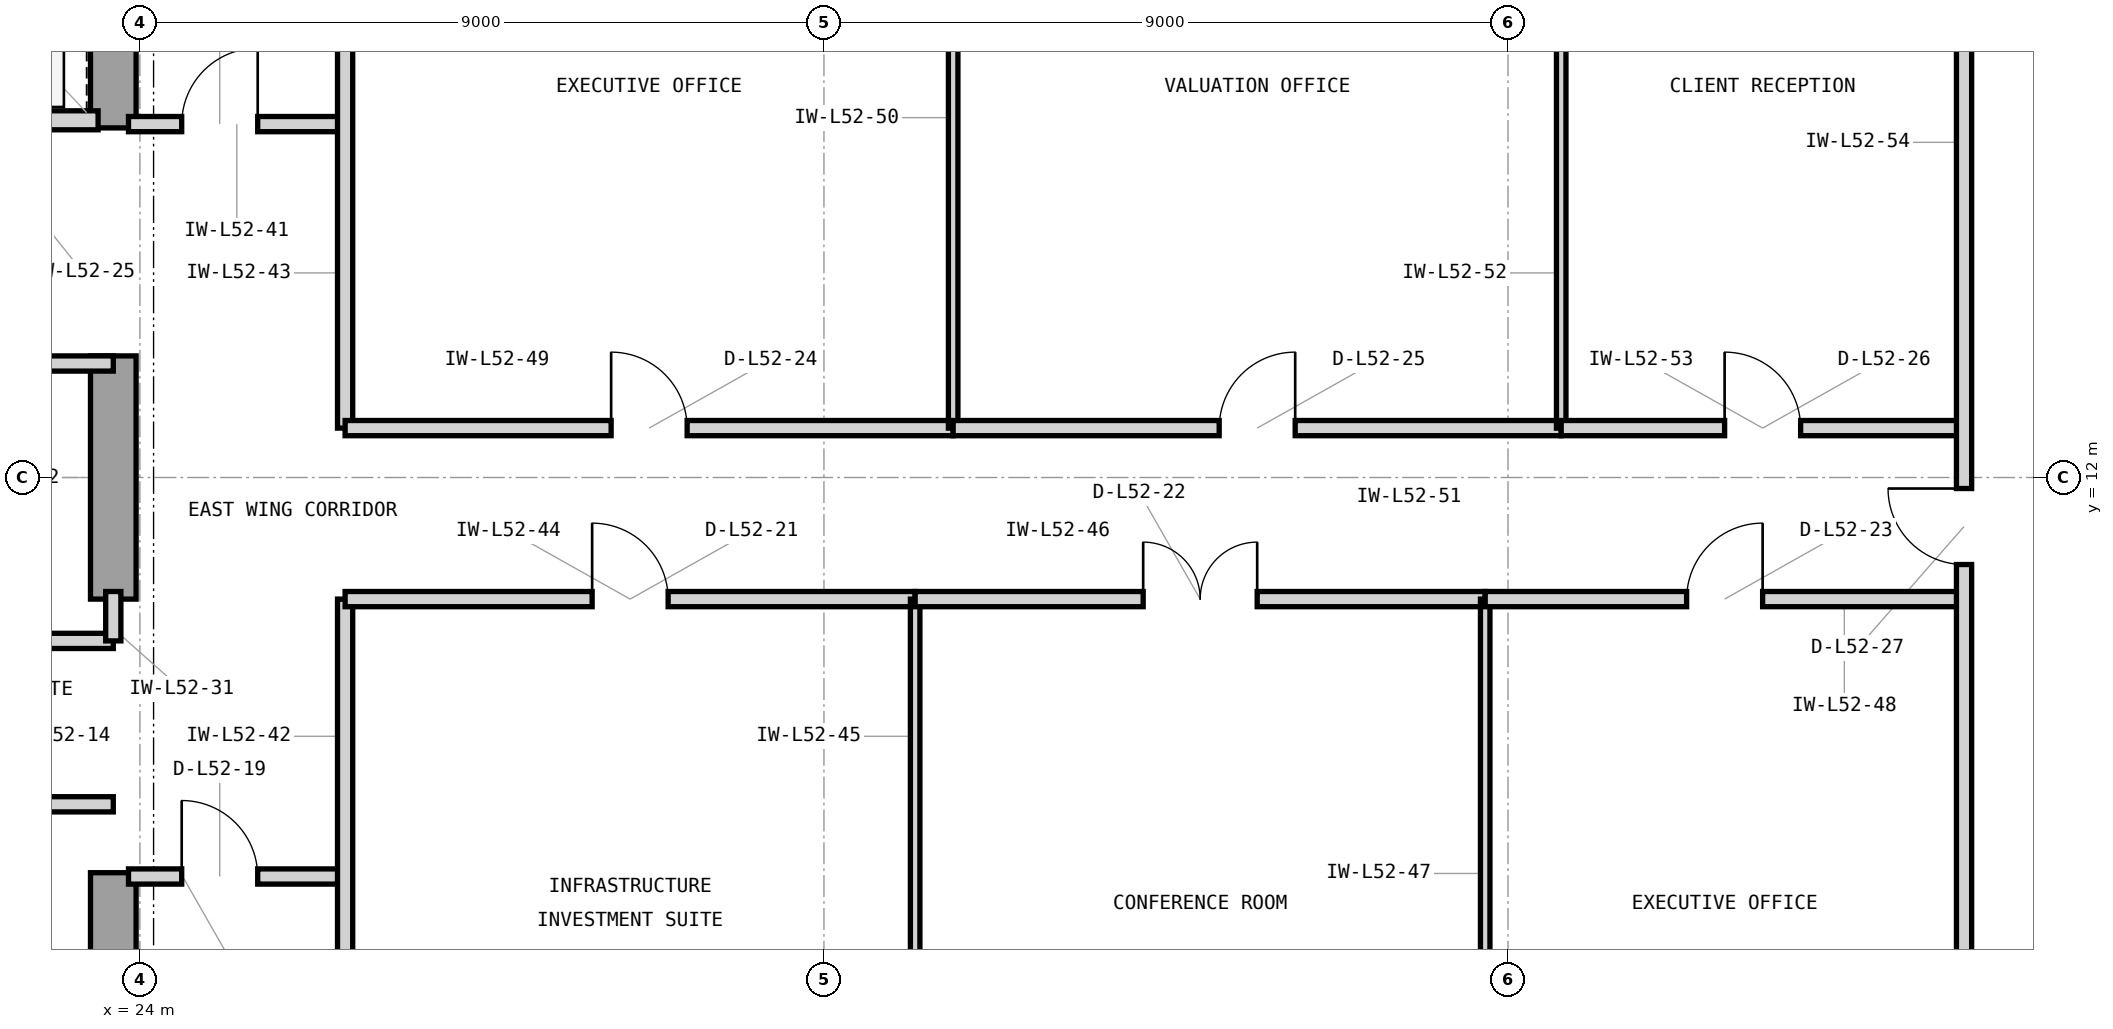
"""IFC4 building model, lengths in metres.
Left out: names, types, materials, properties, quantities, classifications, styles, units other than length and angle.
Written with IfcOpenShell. Run it as: python <this file> out.ifc"""

import sys

from ifc_helpers import new_model, si_unit, direction, frame, frame_2d, origin, place, context, subcontext, project, spatial, rectangle, extrude, element, fill, save


model = new_model("IFC4")
c1 = context("Model", 3, precision=1e-05, world=origin(), true_north=direction((0.0, 1.0)))
c2 = subcontext(c1, "Body", "Model", "MODEL_VIEW")
j1 = project(units=[si_unit("LENGTHUNIT", "METRE"), si_unit("PLANEANGLEUNIT", "RADIAN")], contexts=[c1])
p1 = place(None, origin())
s1 = spatial("IfcSite", under=j1, at=p1, CompositionType="ELEMENT")
p2 = place(p1, origin())
s2 = spatial("IfcBuilding", under=s1, at=p2, CompositionType="ELEMENT")
p3 = place(p2, frame((0.0, 0.0, 215.1)))
s3 = spatial("IfcBuildingStorey", under=s2, at=p3, CompositionType="ELEMENT", Elevation=215.1)
p4 = place(p3, frame((23.65, 3.65, 0.0), z_axis=(0.0, 0.0, 1.0), x_axis=(0.0, 1.0, 0.0)))
e1 = element("IfcWall", 1, at=p4, inside=s3, PredefinedType="SHEAR", context=c2, shape_type="SweptSolid", body=[
    extrude(rectangle(XDim=3.15, YDim=0.6, at=frame_2d((1.575, 0.0))), origin(), (0.0, 0.0, 1.0), 3.9),
])
p5 = place(p3, frame((23.65, 10.4, 0.0), z_axis=(0.0, 0.0, 1.0), x_axis=(0.0, 1.0, 0.0)))
e2 = element("IfcWall", 2, at=p5, inside=s3, PredefinedType="SHEAR", context=c2, shape_type="SweptSolid", body=[
    extrude(rectangle(XDim=3.2, YDim=0.6, at=frame_2d((1.6, 0.0))), origin(), (0.0, 0.0, 1.0), 3.9),
])
p6 = place(p3, frame((23.65, 16.6, 0.0), z_axis=(0.0, 0.0, 1.0), x_axis=(0.0, 1.0, 0.0)))
e3 = element("IfcWall", 3, at=p6, inside=s3, PredefinedType="SHEAR", context=c2, shape_type="SweptSolid", body=[
    extrude(rectangle(XDim=4.05, YDim=0.6, at=frame_2d((2.025, 0.0))), origin(), (0.0, 0.0, 1.0), 3.9),
])
p7 = place(p3, frame((21.05, 16.7, 0.0), z_axis=(0.0, 0.0, 1.0), x_axis=(1.0, 0.0, 0.0)))
e4 = element("IfcWall", 4, at=p7, inside=s3, PredefinedType="PARTITIONING", context=c2, shape_type="SweptSolid", body=[
    extrude(rectangle(XDim=2.4, YDim=0.25, at=frame_2d((1.2, 0.0))), origin(), (0.0, 0.0, 1.0), 3.283),
])
p8 = place(p7, frame((0.52, 0.0, 0.0)))
e5 = element("IfcOpeningElement", 5, at=p8, cuts=e4, PredefinedType="OPENING", context=c2, shape_type="SweptSolid", body=[
    extrude(rectangle(XDim=1.15, YDim=2.25, at=frame_2d((0.575, 1.125))), frame((0.0, 0.135, 0.0), z_axis=(0.0, -1.0, 0.0), x_axis=(1.0, 0.0, 0.0)), (0.0, 0.0, 1.0), 0.27),
])
p9 = place(p3, frame((19.15, 7.7, 0.0), z_axis=(0.0, 0.0, 1.0), x_axis=(1.0, 0.0, 0.0)))
e6 = element("IfcWall", 6, at=p9, inside=s3, PredefinedType="PARTITIONING", context=c2, shape_type="SweptSolid", body=[
    extrude(rectangle(XDim=4.5, YDim=0.2, at=frame_2d((2.25, 0.0))), origin(), (0.0, 0.0, 1.0), 3.69),
])
p10 = place(p9, frame((1.75, 0.0, 0.0)))
e7 = element("IfcOpeningElement", 7, at=p10, cuts=e6, PredefinedType="OPENING", context=c2, shape_type="SweptSolid", body=[
    extrude(rectangle(XDim=1.0, YDim=2.15, at=frame_2d((0.5, 1.075))), frame((0.0, 0.11, 0.0), z_axis=(0.0, -1.0, 0.0), x_axis=(1.0, 0.0, 0.0)), (0.0, 0.0, 1.0), 0.22),
])
p11 = place(p3, frame((14.825, 9.85, 0.0), z_axis=(0.0, 0.0, 1.0), x_axis=(1.0, 0.0, 0.0)))
e8 = element("IfcWall", 8, at=p11, inside=s3, PredefinedType="PARTITIONING", context=c2, shape_type="SweptSolid", body=[
    extrude(rectangle(XDim=8.825, YDim=0.2, at=frame_2d((4.413, 0.0))), origin(), (0.0, 0.0, 1.0), 3.69),
])
p12 = place(p3, frame((23.65, 9.85, 0.0), z_axis=(0.0, 0.0, 1.0), x_axis=(0.0, 1.0, 0.0)))
e9 = element("IfcWall", 9, at=p12, inside=s3, PredefinedType="PARTITIONING", context=c2, shape_type="SweptSolid", body=[
    extrude(rectangle(XDim=0.65, YDim=0.2, at=frame_2d((0.325, 0.0))), origin(), (0.0, 0.0, 1.0), 3.69),
])
p13 = place(p3, frame((19.85, 13.5, 0.0), z_axis=(0.0, 0.0, 1.0), x_axis=(1.0, 0.0, 0.0)))
e10 = element("IfcWall", 10, at=p13, inside=s3, PredefinedType="PARTITIONING", context=c2, shape_type="SweptSolid", body=[
    extrude(rectangle(XDim=3.8, YDim=0.2, at=frame_2d((1.9, 0.0))), origin(), (0.0, 0.0, 1.0), 3.283),
])
p14 = place(p13, frame((1.425, 0.0, 0.0)))
e11 = element("IfcOpeningElement", 11, at=p14, cuts=e10, PredefinedType="OPENING", context=c2, shape_type="SweptSolid", body=[
    extrude(rectangle(XDim=0.95, YDim=2.1, at=frame_2d((0.475, 1.05))), frame((0.0, 0.11, 0.0), z_axis=(0.0, -1.0, 0.0), x_axis=(1.0, 0.0, 0.0)), (0.0, 0.0, 1.0), 0.22),
])
p15 = place(p3, frame((23.85, 6.75, 0.0), z_axis=(0.0, 0.0, 1.0), x_axis=(1.0, 0.0, 0.0)))
e12 = element("IfcWall", 12, at=p15, inside=s3, PredefinedType="PARTITIONING", context=c2, shape_type="SweptSolid", body=[
    extrude(rectangle(XDim=2.85, YDim=0.2, at=frame_2d((1.425, 0.0))), origin(), (0.0, 0.0, 1.0), 3.69),
])
p16 = place(p15, frame((0.7, 0.0, 0.0)))
e13 = element("IfcOpeningElement", 13, at=p16, cuts=e12, PredefinedType="OPENING", context=c2, shape_type="SweptSolid", body=[
    extrude(rectangle(XDim=1.0, YDim=2.15, at=frame_2d((0.5, 1.075))), frame((0.0, 0.11, 0.0), z_axis=(0.0, -1.0, 0.0), x_axis=(1.0, 0.0, 0.0)), (0.0, 0.0, 1.0), 0.22),
])
p17 = place(p3, frame((23.85, 16.65, 0.0), z_axis=(0.0, 0.0, 1.0), x_axis=(1.0, 0.0, 0.0)))
e14 = element("IfcWall", 14, at=p17, inside=s3, PredefinedType="PARTITIONING", context=c2, shape_type="SweptSolid", body=[
    extrude(rectangle(XDim=2.85, YDim=0.2, at=frame_2d((1.425, 0.0))), origin(), (0.0, 0.0, 1.0), 3.69),
])
p18 = place(p17, frame((0.7, 0.0, 0.0)))
e15 = element("IfcOpeningElement", 15, at=p18, cuts=e14, PredefinedType="OPENING", context=c2, shape_type="SweptSolid", body=[
    extrude(rectangle(XDim=1.0, YDim=2.15, at=frame_2d((0.5, 1.075))), frame((0.0, 0.11, 0.0), z_axis=(0.0, -1.0, 0.0), x_axis=(1.0, 0.0, 0.0)), (0.0, 0.0, 1.0), 0.22),
])
p19 = place(p3, frame((26.7, 3.18, 0.0), z_axis=(0.0, 0.0, 1.0), x_axis=(0.0, 1.0, 0.0)))
e16 = element("IfcWall", 16, at=p19, inside=s3, PredefinedType="PARTITIONING", context=c2, shape_type="SweptSolid", body=[
    extrude(rectangle(XDim=7.22, YDim=0.2, at=frame_2d((3.61, 0.0))), origin(), (0.0, 0.0, 1.0), 3.69),
])
p20 = place(p3, frame((26.7, 12.65, 0.0), z_axis=(0.0, 0.0, 1.0), x_axis=(0.0, 1.0, 0.0)))
e17 = element("IfcWall", 17, at=p20, inside=s3, PredefinedType="PARTITIONING", context=c2, shape_type="SweptSolid", body=[
    extrude(rectangle(XDim=8.17, YDim=0.2, at=frame_2d((4.085, 0.0))), origin(), (0.0, 0.0, 1.0), 3.69),
])
p21 = place(p3, frame((26.7, 10.4, 0.0), z_axis=(0.0, 0.0, 1.0), x_axis=(1.0, 0.0, 0.0)))
e18 = element("IfcWall", 18, at=p21, inside=s3, PredefinedType="PARTITIONING", context=c2, shape_type="SweptSolid", body=[
    extrude(rectangle(XDim=7.5, YDim=0.2, at=frame_2d((3.75, 0.0))), origin(), (0.0, 0.0, 1.0), 3.69),
])
p22 = place(p21, frame((3.25, 0.0, 0.0)))
e19 = element("IfcOpeningElement", 19, at=p22, cuts=e18, PredefinedType="OPENING", context=c2, shape_type="SweptSolid", body=[
    extrude(rectangle(XDim=1.0, YDim=2.15, at=frame_2d((0.5, 1.075))), frame((0.0, 0.11, 0.0), z_axis=(0.0, -1.0, 0.0), x_axis=(1.0, 0.0, 0.0)), (0.0, 0.0, 1.0), 0.22),
])
p23 = place(p3, frame((34.2, 3.18, 0.0), z_axis=(0.0, 0.0, 1.0), x_axis=(0.0, 1.0, 0.0)))
e20 = element("IfcWall", 20, at=p23, inside=s3, PredefinedType="PARTITIONING", context=c2, shape_type="SweptSolid", body=[
    extrude(rectangle(XDim=7.22, YDim=0.125, at=frame_2d((3.61, 0.0))), origin(), (0.0, 0.0, 1.0), 3.69),
])
p24 = place(p3, frame((34.2, 10.4, 0.0), z_axis=(0.0, 0.0, 1.0), x_axis=(1.0, 0.0, 0.0)))
e21 = element("IfcWall", 21, at=p24, inside=s3, PredefinedType="PARTITIONING", context=c2, shape_type="SweptSolid", body=[
    extrude(rectangle(XDim=7.5, YDim=0.2, at=frame_2d((3.75, 0.0))), origin(), (0.0, 0.0, 1.0), 3.69),
])
p25 = place(p24, frame((3.0, 0.0, 0.0)))
e22 = element("IfcOpeningElement", 22, at=p25, cuts=e21, PredefinedType="OPENING", context=c2, shape_type="SweptSolid", body=[
    extrude(rectangle(XDim=1.5, YDim=2.3, at=frame_2d((0.75, 1.15))), frame((0.0, 0.11, 0.0), z_axis=(0.0, -1.0, 0.0), x_axis=(1.0, 0.0, 0.0)), (0.0, 0.0, 1.0), 0.22),
])
p26 = place(p3, frame((41.7, 3.18, 0.0), z_axis=(0.0, 0.0, 1.0), x_axis=(0.0, 1.0, 0.0)))
e23 = element("IfcWall", 23, at=p26, inside=s3, PredefinedType="PARTITIONING", context=c2, shape_type="SweptSolid", body=[
    extrude(rectangle(XDim=7.22, YDim=0.125, at=frame_2d((3.61, 0.0))), origin(), (0.0, 0.0, 1.0), 3.69),
])
p27 = place(p3, frame((41.7, 10.4, 0.0), z_axis=(0.0, 0.0, 1.0), x_axis=(1.0, 0.0, 0.0)))
e24 = element("IfcWall", 24, at=p27, inside=s3, PredefinedType="PARTITIONING", context=c2, shape_type="SweptSolid", body=[
    extrude(rectangle(XDim=6.3, YDim=0.2, at=frame_2d((3.15, 0.0))), origin(), (0.0, 0.0, 1.0), 3.69),
])
p28 = place(p27, frame((2.65, 0.0, 0.0)))
e25 = element("IfcOpeningElement", 25, at=p28, cuts=e24, PredefinedType="OPENING", context=c2, shape_type="SweptSolid", body=[
    extrude(rectangle(XDim=1.0, YDim=2.15, at=frame_2d((0.5, 1.075))), frame((0.0, 0.11, 0.0), z_axis=(0.0, -1.0, 0.0), x_axis=(1.0, 0.0, 0.0)), (0.0, 0.0, 1.0), 0.22),
])
p29 = place(p3, frame((26.7, 12.65, 0.0), z_axis=(0.0, 0.0, 1.0), x_axis=(1.0, 0.0, 0.0)))
e26 = element("IfcWall", 26, at=p29, inside=s3, PredefinedType="PARTITIONING", context=c2, shape_type="SweptSolid", body=[
    extrude(rectangle(XDim=8.0, YDim=0.2, at=frame_2d((4.0, 0.0))), origin(), (0.0, 0.0, 1.0), 3.69),
])
p30 = place(p29, frame((3.5, 0.0, 0.0)))
e27 = element("IfcOpeningElement", 27, at=p30, cuts=e26, PredefinedType="OPENING", context=c2, shape_type="SweptSolid", body=[
    extrude(rectangle(XDim=1.0, YDim=2.15, at=frame_2d((0.5, 1.075))), frame((0.0, 0.11, 0.0), z_axis=(0.0, -1.0, 0.0), x_axis=(1.0, 0.0, 0.0)), (0.0, 0.0, 1.0), 0.22),
])
p31 = place(p3, frame((34.7, 12.65, 0.0), z_axis=(0.0, 0.0, 1.0), x_axis=(0.0, 1.0, 0.0)))
e28 = element("IfcWall", 28, at=p31, inside=s3, PredefinedType="PARTITIONING", context=c2, shape_type="SweptSolid", body=[
    extrude(rectangle(XDim=8.17, YDim=0.125, at=frame_2d((4.085, 0.0))), origin(), (0.0, 0.0, 1.0), 3.69),
])
p32 = place(p3, frame((34.7, 12.65, 0.0), z_axis=(0.0, 0.0, 1.0), x_axis=(1.0, 0.0, 0.0)))
e29 = element("IfcWall", 29, at=p32, inside=s3, PredefinedType="PARTITIONING", context=c2, shape_type="SweptSolid", body=[
    extrude(rectangle(XDim=8.0, YDim=0.2, at=frame_2d((4.0, 0.0))), origin(), (0.0, 0.0, 1.0), 3.69),
])
p33 = place(p32, frame((3.5, 0.0, 0.0)))
e30 = element("IfcOpeningElement", 30, at=p33, cuts=e29, PredefinedType="OPENING", context=c2, shape_type="SweptSolid", body=[
    extrude(rectangle(XDim=1.0, YDim=2.15, at=frame_2d((0.5, 1.075))), frame((0.0, 0.11, 0.0), z_axis=(0.0, -1.0, 0.0), x_axis=(1.0, 0.0, 0.0)), (0.0, 0.0, 1.0), 0.22),
])
p34 = place(p3, frame((42.7, 12.65, 0.0), z_axis=(0.0, 0.0, 1.0), x_axis=(0.0, 1.0, 0.0)))
e31 = element("IfcWall", 31, at=p34, inside=s3, PredefinedType="PARTITIONING", context=c2, shape_type="SweptSolid", body=[
    extrude(rectangle(XDim=8.17, YDim=0.125, at=frame_2d((4.085, 0.0))), origin(), (0.0, 0.0, 1.0), 3.69),
])
p35 = place(p3, frame((42.7, 12.65, 0.0), z_axis=(0.0, 0.0, 1.0), x_axis=(1.0, 0.0, 0.0)))
e32 = element("IfcWall", 32, at=p35, inside=s3, PredefinedType="PARTITIONING", context=c2, shape_type="SweptSolid", body=[
    extrude(rectangle(XDim=5.3, YDim=0.2, at=frame_2d((2.65, 0.0))), origin(), (0.0, 0.0, 1.0), 3.69),
])
p36 = place(p35, frame((2.15, 0.0, 0.0)))
e33 = element("IfcOpeningElement", 33, at=p36, cuts=e32, PredefinedType="OPENING", context=c2, shape_type="SweptSolid", body=[
    extrude(rectangle(XDim=1.0, YDim=2.15, at=frame_2d((0.5, 1.075))), frame((0.0, 0.11, 0.0), z_axis=(0.0, -1.0, 0.0), x_axis=(1.0, 0.0, 0.0)), (0.0, 0.0, 1.0), 0.22),
])
p37 = place(p3, frame((48.0, 3.18, 0.0), z_axis=(0.0, 0.0, 1.0), x_axis=(0.0, 1.0, 0.0)))
e34 = element("IfcWall", 34, at=p37, inside=s3, PredefinedType="PARTITIONING", context=c2, shape_type="SweptSolid", body=[
    extrude(rectangle(XDim=17.64, YDim=0.2, at=frame_2d((8.82, 0.0))), origin(), (0.0, 0.0, 1.0), 3.073),
])
p38 = place(p37, frame((7.675, 0.0, 0.0)))
e35 = element("IfcOpeningElement", 35, at=p38, cuts=e34, PredefinedType="OPENING", context=c2, shape_type="SweptSolid", body=[
    extrude(rectangle(XDim=1.0, YDim=2.15, at=frame_2d((0.5, 1.075))), frame((0.0, 0.11, 0.0), z_axis=(0.0, -1.0, 0.0), x_axis=(1.0, 0.0, 0.0)), (0.0, 0.0, 1.0), 0.22),
])
p39 = place(p16, origin())
e36 = element("IfcDoor", 36, at=p39, inside=s3, OperationType="SINGLE_SWING_LEFT", PredefinedType="DOOR", context=c2, shape_type="SweptSolid", body=[
    extrude(rectangle(XDim=1.0, YDim=2.15, at=frame_2d((0.5, 1.075))), frame((0.0, 0.025, 0.0), z_axis=(0.0, -1.0, 0.0), x_axis=(1.0, 0.0, 0.0)), (0.0, 0.0, 1.0), 0.05),
])
fill(e13, e36)
p40 = place(p18, origin())
e37 = element("IfcDoor", 37, at=p40, inside=s3, OperationType="SINGLE_SWING_RIGHT", PredefinedType="DOOR", context=c2, shape_type="SweptSolid", body=[
    extrude(rectangle(XDim=1.0, YDim=2.15, at=frame_2d((0.5, 1.075))), frame((0.0, 0.025, 0.0), z_axis=(0.0, -1.0, 0.0), x_axis=(1.0, 0.0, 0.0)), (0.0, 0.0, 1.0), 0.05),
])
fill(e15, e37)
p41 = place(p22, origin())
e38 = element("IfcDoor", 38, at=p41, inside=s3, OperationType="SINGLE_SWING_LEFT", PredefinedType="DOOR", context=c2, shape_type="SweptSolid", body=[
    extrude(rectangle(XDim=1.0, YDim=2.15, at=frame_2d((0.5, 1.075))), frame((0.0, 0.025, 0.0), z_axis=(0.0, -1.0, 0.0), x_axis=(1.0, 0.0, 0.0)), (0.0, 0.0, 1.0), 0.05),
])
fill(e19, e38)
p42 = place(p25, origin())
e39 = element("IfcDoor", 39, at=p42, inside=s3, OperationType="DOUBLE_DOOR_SINGLE_SWING", PredefinedType="DOOR", context=c2, shape_type="SweptSolid", body=[
    extrude(rectangle(XDim=1.5, YDim=2.3, at=frame_2d((0.75, 1.15))), frame((0.0, 0.025, 0.0), z_axis=(0.0, -1.0, 0.0), x_axis=(1.0, 0.0, 0.0)), (0.0, 0.0, 1.0), 0.05),
])
fill(e22, e39)
p43 = place(p28, origin())
e40 = element("IfcDoor", 40, at=p43, inside=s3, OperationType="SINGLE_SWING_RIGHT", PredefinedType="DOOR", context=c2, shape_type="SweptSolid", body=[
    extrude(rectangle(XDim=1.0, YDim=2.15, at=frame_2d((0.5, 1.075))), frame((0.0, 0.025, 0.0), z_axis=(0.0, -1.0, 0.0), x_axis=(1.0, 0.0, 0.0)), (0.0, 0.0, 1.0), 0.05),
])
fill(e25, e40)
p44 = place(p30, origin())
e41 = element("IfcDoor", 41, at=p44, inside=s3, OperationType="SINGLE_SWING_LEFT", PredefinedType="DOOR", context=c2, shape_type="SweptSolid", body=[
    extrude(rectangle(XDim=1.0, YDim=2.15, at=frame_2d((0.5, 1.075))), frame((0.0, 0.025, 0.0), z_axis=(0.0, -1.0, 0.0), x_axis=(1.0, 0.0, 0.0)), (0.0, 0.0, 1.0), 0.05),
])
fill(e27, e41)
p45 = place(p33, origin())
e42 = element("IfcDoor", 42, at=p45, inside=s3, OperationType="SINGLE_SWING_RIGHT", PredefinedType="DOOR", context=c2, shape_type="SweptSolid", body=[
    extrude(rectangle(XDim=1.0, YDim=2.15, at=frame_2d((0.5, 1.075))), frame((0.0, 0.025, 0.0), z_axis=(0.0, -1.0, 0.0), x_axis=(1.0, 0.0, 0.0)), (0.0, 0.0, 1.0), 0.05),
])
fill(e30, e42)
p46 = place(p36, origin())
e43 = element("IfcDoor", 43, at=p46, inside=s3, OperationType="SINGLE_SWING_LEFT", PredefinedType="DOOR", context=c2, shape_type="SweptSolid", body=[
    extrude(rectangle(XDim=1.0, YDim=2.15, at=frame_2d((0.5, 1.075))), frame((0.0, 0.025, 0.0), z_axis=(0.0, -1.0, 0.0), x_axis=(1.0, 0.0, 0.0)), (0.0, 0.0, 1.0), 0.05),
])
fill(e33, e43)
p47 = place(p38, origin())
e44 = element("IfcDoor", 44, at=p47, inside=s3, OperationType="SINGLE_SWING_RIGHT", PredefinedType="DOOR", context=c2, shape_type="SweptSolid", body=[
    extrude(rectangle(XDim=1.0, YDim=2.15, at=frame_2d((0.5, 1.075))), frame((0.0, 0.025, 0.0), z_axis=(0.0, -1.0, 0.0), x_axis=(1.0, 0.0, 0.0)), (0.0, 0.0, 1.0), 0.05),
])
fill(e35, e44)
save(model, sys.argv[1])
